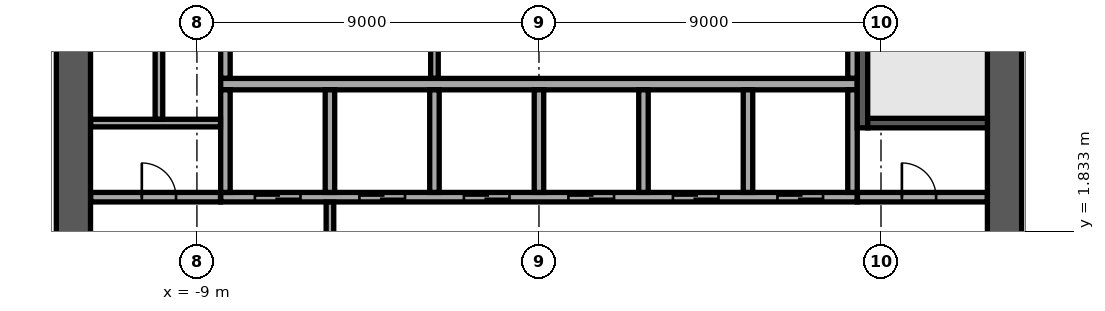
"""IFC4 building model, lengths in metres.
Left out: names, types, materials, properties, quantities, classifications, styles, units other than length and angle.
Written with IfcOpenShell. Run it as: python <this file> out.ifc"""

import sys

from ifc_helpers import new_model, si_unit, direction, frame, frame_2d, origin, place, context, subcontext, project, spatial, rectangle, extrude, element, fill, save


model = new_model("IFC4")
c1 = context("Model", 3, precision=1e-05, world=origin(), true_north=direction((0.0, 1.0)))
c2 = subcontext(c1, "Body", "Model", "MODEL_VIEW")
j1 = project(units=[si_unit("LENGTHUNIT", "METRE"), si_unit("PLANEANGLEUNIT", "RADIAN")], contexts=[c1])
p1 = place(None, origin())
s1 = spatial("IfcSite", under=j1, at=p1, CompositionType="ELEMENT")
p2 = place(p1, origin())
s2 = spatial("IfcBuilding", under=s1, at=p2, CompositionType="ELEMENT")
p3 = place(p2, frame((0.0, 0.0, 189.3)))
s3 = spatial("IfcBuildingStorey", under=s2, at=p3, CompositionType="ELEMENT", Elevation=189.3)
p4 = place(p3, frame((12.25, -11.8, 0.0), z_axis=(0.0, 0.0, 1.0), x_axis=(0.0, 1.0, 0.0)))
e1 = element("IfcWall", 1, at=p4, inside=s3, PredefinedType="SHEAR", context=c2, shape_type="SweptSolid", body=[
    extrude(rectangle(XDim=23.6, YDim=0.9, at=frame_2d((11.8, 0.0))), origin(), (0.0, 0.0, 1.0), 3.62),
])
p5 = place(p4, frame((10.6, 0.0, 0.0)))
e2 = element("IfcOpeningElement", 2, at=p5, cuts=e1, PredefinedType="OPENING", context=c2, shape_type="SweptSolid", body=[
    extrude(rectangle(XDim=2.4, YDim=2.4, at=frame_2d((1.2, 1.2))), frame((0.0, 0.46, 0.0), z_axis=(0.0, -1.0, 0.0), x_axis=(1.0, 0.0, 0.0)), (0.0, 0.0, 1.0), 0.92),
])
p6 = place(p3, frame((-12.25, -11.8, 0.0), z_axis=(0.0, 0.0, 1.0), x_axis=(0.0, 1.0, 0.0)))
e3 = element("IfcWall", 3, at=p6, inside=s3, PredefinedType="SHEAR", context=c2, shape_type="SweptSolid", body=[
    extrude(rectangle(XDim=23.6, YDim=0.9, at=frame_2d((11.8, 0.0))), origin(), (0.0, 0.0, 1.0), 3.62),
])
p7 = place(p6, frame((10.6, 0.0, 0.0)))
e4 = element("IfcOpeningElement", 4, at=p7, cuts=e3, PredefinedType="OPENING", context=c2, shape_type="SweptSolid", body=[
    extrude(rectangle(XDim=2.4, YDim=2.4, at=frame_2d((1.2, 1.2))), frame((0.0, 0.46, 0.0), z_axis=(0.0, -1.0, 0.0), x_axis=(1.0, 0.0, 0.0)), (0.0, 0.0, 1.0), 0.92),
])
p8 = place(p3, frame((-8.375, 5.7, 0.0), z_axis=(0.0, 0.0, 1.0), x_axis=(1.0, 0.0, 0.0)))
e5 = element("IfcWall", 5, at=p8, inside=s3, PredefinedType="SOLIDWALL", context=c2, shape_type="SweptSolid", body=[
    extrude(rectangle(XDim=16.75, YDim=0.3, at=frame_2d((8.375, 0.0))), origin(), (0.0, 0.0, 1.0), 3.62),
])
p9 = place(p3, frame((-8.375, 2.725, 0.0), z_axis=(0.0, 0.0, 1.0), x_axis=(1.0, 0.0, 0.0)))
e6 = element("IfcWall", 6, at=p9, inside=s3, PredefinedType="SOLIDWALL", context=c2, shape_type="SweptSolid", body=[
    extrude(rectangle(XDim=16.75, YDim=0.25, at=frame_2d((8.375, 0.0))), origin(), (0.0, 0.0, 1.0), 3.62),
])
p10 = place(p9, frame((0.9, 0.0, 0.0)))
e7 = element("IfcOpeningElement", 7, at=p10, cuts=e6, PredefinedType="OPENING", context=c2, shape_type="SweptSolid", body=[
    extrude(rectangle(XDim=1.2, YDim=2.1, at=frame_2d((0.6, 1.05))), frame((0.0, 0.135, 0.0), z_axis=(0.0, -1.0, 0.0), x_axis=(1.0, 0.0, 0.0)), (0.0, 0.0, 1.0), 0.27),
])
p11 = place(p9, frame((3.65, 0.0, 0.0)))
e8 = element("IfcOpeningElement", 8, at=p11, cuts=e6, PredefinedType="OPENING", context=c2, shape_type="SweptSolid", body=[
    extrude(rectangle(XDim=1.2, YDim=2.1, at=frame_2d((0.6, 1.05))), frame((0.0, 0.135, 0.0), z_axis=(0.0, -1.0, 0.0), x_axis=(1.0, 0.0, 0.0)), (0.0, 0.0, 1.0), 0.27),
])
p12 = place(p9, frame((6.4, 0.0, 0.0)))
e9 = element("IfcOpeningElement", 9, at=p12, cuts=e6, PredefinedType="OPENING", context=c2, shape_type="SweptSolid", body=[
    extrude(rectangle(XDim=1.2, YDim=2.1, at=frame_2d((0.6, 1.05))), frame((0.0, 0.135, 0.0), z_axis=(0.0, -1.0, 0.0), x_axis=(1.0, 0.0, 0.0)), (0.0, 0.0, 1.0), 0.27),
])
p13 = place(p9, frame((9.15, 0.0, 0.0)))
e10 = element("IfcOpeningElement", 10, at=p13, cuts=e6, PredefinedType="OPENING", context=c2, shape_type="SweptSolid", body=[
    extrude(rectangle(XDim=1.2, YDim=2.1, at=frame_2d((0.6, 1.05))), frame((0.0, 0.135, 0.0), z_axis=(0.0, -1.0, 0.0), x_axis=(1.0, 0.0, 0.0)), (0.0, 0.0, 1.0), 0.27),
])
p14 = place(p9, frame((11.9, 0.0, 0.0)))
e11 = element("IfcOpeningElement", 11, at=p14, cuts=e6, PredefinedType="OPENING", context=c2, shape_type="SweptSolid", body=[
    extrude(rectangle(XDim=1.2, YDim=2.1, at=frame_2d((0.6, 1.05))), frame((0.0, 0.135, 0.0), z_axis=(0.0, -1.0, 0.0), x_axis=(1.0, 0.0, 0.0)), (0.0, 0.0, 1.0), 0.27),
])
p15 = place(p9, frame((14.65, 0.0, 0.0)))
e12 = element("IfcOpeningElement", 12, at=p15, cuts=e6, PredefinedType="OPENING", context=c2, shape_type="SweptSolid", body=[
    extrude(rectangle(XDim=1.2, YDim=2.1, at=frame_2d((0.6, 1.05))), frame((0.0, 0.135, 0.0), z_axis=(0.0, -1.0, 0.0), x_axis=(1.0, 0.0, 0.0)), (0.0, 0.0, 1.0), 0.27),
])
for number, where, z_axis, x_axis in (
    (13, (-8.25, 2.85, 0.0), (0.0, 0.0, 1.0), (0.0, 1.0, 0.0)),
    (14, (-5.5, 2.85, 0.0), (0.0, 0.0, 1.0), (0.0, 1.0, 0.0)),
    (15, (-2.75, 2.85, 0.0), (0.0, 0.0, 1.0), (0.0, 1.0, 0.0)),
    (16, (0.0, 2.85, 0.0), (0.0, 0.0, 1.0), (0.0, 1.0, 0.0)),
    (17, (2.75, 2.85, 0.0), (0.0, 0.0, 1.0), (0.0, 1.0, 0.0)),
    (18, (5.5, 2.85, 0.0), (0.0, 0.0, 1.0), (0.0, 1.0, 0.0)),
    (19, (8.25, 2.85, 0.0), (0.0, 0.0, 1.0), (0.0, 1.0, 0.0)),
):
    element("IfcWall", number, at=place(p3, frame(where, z_axis=z_axis, x_axis=x_axis)), inside=s3, PredefinedType="SOLIDWALL", context=c2, shape_type="SweptSolid", body=[
        extrude(rectangle(XDim=2.7, YDim=0.25, at=frame_2d((1.35, 0.0))), origin(), (0.0, 0.0, 1.0), 3.62),
    ])
p16 = place(p3, frame((8.512, 4.55, 0.0), z_axis=(0.0, 0.0, 1.0), x_axis=(0.0, 1.0, 0.0)))
e20 = element("IfcWall", 20, at=p16, inside=s3, PredefinedType="SOLIDWALL", context=c2, shape_type="SweptSolid", body=[
    extrude(rectangle(XDim=7.25, YDim=0.275, at=frame_2d((3.625, 0.0))), origin(), (0.0, 0.0, 1.0), 3.62),
])
p17 = place(p16, frame((6.0, 0.0, 0.0)))
e21 = element("IfcOpeningElement", 21, at=p17, cuts=e20, PredefinedType="OPENING", context=c2, shape_type="SweptSolid", body=[
    extrude(rectangle(XDim=1.0, YDim=2.1, at=frame_2d((0.5, 1.05))), frame((0.0, 0.147, 0.0), z_axis=(0.0, -1.0, 0.0), x_axis=(1.0, 0.0, 0.0)), (0.0, 0.0, 1.0), 0.295),
])
p18 = place(p3, frame((8.65, 4.675, 0.0), z_axis=(0.0, 0.0, 1.0), x_axis=(1.0, 0.0, 0.0)))
e22 = element("IfcWall", 22, at=p18, inside=s3, PredefinedType="SOLIDWALL", context=c2, shape_type="SweptSolid", body=[
    extrude(rectangle(XDim=3.15, YDim=0.25, at=frame_2d((1.575, 0.0))), origin(), (0.0, 0.0, 1.0), 3.62),
])
p19 = place(p3, frame((-5.5, -2.595, 0.0), z_axis=(0.0, 0.0, 1.0), x_axis=(0.0, 1.0, 0.0)))
e23 = element("IfcWall", 23, at=p19, inside=s3, PredefinedType="PARTITIONING", context=c2, shape_type="SweptSolid", body=[
    extrude(rectangle(XDim=5.19, YDim=0.2, at=frame_2d((2.595, 0.0))), origin(), (0.0, 0.0, 1.0), 3.62),
])
p20 = place(p19, frame((1.395, 0.0, 0.0)))
e24 = element("IfcOpeningElement", 24, at=p20, cuts=e23, PredefinedType="OPENING", context=c2, shape_type="SweptSolid", body=[
    extrude(rectangle(XDim=2.4, YDim=2.4, at=frame_2d((1.2, 1.2))), frame((0.0, 0.11, 0.0), z_axis=(0.0, -1.0, 0.0), x_axis=(1.0, 0.0, 0.0)), (0.0, 0.0, 1.0), 0.22),
])
p21 = place(p3, frame((-11.795, 2.725, 0.0), z_axis=(0.0, 0.0, 1.0), x_axis=(1.0, 0.0, 0.0)))
e25 = element("IfcWall", 25, at=p21, inside=s3, PredefinedType="PARTITIONING", context=c2, shape_type="SweptSolid", body=[
    extrude(rectangle(XDim=3.415, YDim=0.25, at=frame_2d((1.708, 0.0))), origin(), (0.0, 0.0, 1.0), 3.62),
])
p22 = place(p21, frame((1.345, 0.0, 0.0)))
e26 = element("IfcOpeningElement", 26, at=p22, cuts=e25, PredefinedType="OPENING", context=c2, shape_type="SweptSolid", body=[
    extrude(rectangle(XDim=0.9, YDim=2.1, at=frame_2d((0.45, 1.05))), frame((0.0, 0.135, 0.0), z_axis=(0.0, -1.0, 0.0), x_axis=(1.0, 0.0, 0.0)), (0.0, 0.0, 1.0), 0.27),
])
p23 = place(p3, frame((8.38, 2.725, 0.0), z_axis=(0.0, 0.0, 1.0), x_axis=(1.0, 0.0, 0.0)))
e27 = element("IfcWall", 27, at=p23, inside=s3, PredefinedType="PARTITIONING", context=c2, shape_type="SweptSolid", body=[
    extrude(rectangle(XDim=3.415, YDim=0.25, at=frame_2d((1.708, 0.0))), origin(), (0.0, 0.0, 1.0), 3.62),
])
p24 = place(p23, frame((1.17, 0.0, 0.0)))
e28 = element("IfcOpeningElement", 28, at=p24, cuts=e27, PredefinedType="OPENING", context=c2, shape_type="SweptSolid", body=[
    extrude(rectangle(XDim=0.9, YDim=2.1, at=frame_2d((0.45, 1.05))), frame((0.0, 0.135, 0.0), z_axis=(0.0, -1.0, 0.0), x_axis=(1.0, 0.0, 0.0)), (0.0, 0.0, 1.0), 0.27),
])
p25 = place(p3, frame((-11.795, 4.675, 0.0), z_axis=(0.0, 0.0, 1.0), x_axis=(1.0, 0.0, 0.0)))
e29 = element("IfcWall", 29, at=p25, inside=s3, PredefinedType="PARTITIONING", context=c2, shape_type="SweptSolid", body=[
    extrude(rectangle(XDim=3.415, YDim=0.2, at=frame_2d((1.708, 0.0))), origin(), (0.0, 0.0, 1.0), 3.62),
])
p26 = place(p3, frame((-10.0, 4.78, 0.0), z_axis=(0.0, 0.0, 1.0), x_axis=(0.0, 1.0, 0.0)))
e30 = element("IfcWall", 30, at=p26, inside=s3, PredefinedType="PARTITIONING", context=c2, shape_type="SweptSolid", body=[
    extrude(rectangle(XDim=7.015, YDim=0.2, at=frame_2d((3.507, 0.0))), origin(), (0.0, 0.0, 1.0), 3.62),
])
p27 = place(p26, frame((2.92, 0.0, 0.0)))
e31 = element("IfcOpeningElement", 31, at=p27, cuts=e30, PredefinedType="OPENING", context=c2, shape_type="SweptSolid", body=[
    extrude(rectangle(XDim=1.0, YDim=2.1, at=frame_2d((0.5, 1.05))), frame((0.0, 0.11, 0.0), z_axis=(0.0, -1.0, 0.0), x_axis=(1.0, 0.0, 0.0)), (0.0, 0.0, 1.0), 0.22),
])
p28 = place(p3, frame((-8.25, 5.855, 0.0), z_axis=(0.0, 0.0, 1.0), x_axis=(0.0, 1.0, 0.0)))
e32 = element("IfcWall", 32, at=p28, inside=s3, PredefinedType="PARTITIONING", context=c2, shape_type="SweptSolid", body=[
    extrude(rectangle(XDim=2.69, YDim=0.25, at=frame_2d((1.345, 0.0))), origin(), (0.0, 0.0, 1.0), 3.62),
])
p29 = place(p3, frame((-2.75, 5.855, 0.0), z_axis=(0.0, 0.0, 1.0), x_axis=(0.0, 1.0, 0.0)))
e33 = element("IfcWall", 33, at=p29, inside=s3, PredefinedType="PARTITIONING", context=c2, shape_type="SweptSolid", body=[
    extrude(rectangle(XDim=2.69, YDim=0.2, at=frame_2d((1.345, 0.0))), origin(), (0.0, 0.0, 1.0), 3.62),
])
p30 = place(p3, frame((8.25, 5.855, 0.0), z_axis=(0.0, 0.0, 1.0), x_axis=(0.0, 1.0, 0.0)))
e34 = element("IfcWall", 34, at=p30, inside=s3, PredefinedType="PARTITIONING", context=c2, shape_type="SweptSolid", body=[
    extrude(rectangle(XDim=2.69, YDim=0.25, at=frame_2d((1.345, 0.0))), origin(), (0.0, 0.0, 1.0), 3.62),
])
p31 = place(p3, frame((2.286, 34.715, 0.0), z_axis=(0.0, 0.0, 1.0), x_axis=(-0.754708272811, -0.656060532993, 0.0)))
e35 = element("IfcWall", 35, at=p31, inside=s3, PredefinedType="STANDARD", context=c2, shape_type="SweptSolid", body=[
    extrude(rectangle(XDim=49.0, YDim=0.6, at=frame_2d((24.5, 0.0))), origin(), (0.0, 0.0, 1.0), 3.62),
])
p32 = place(p31, frame((1.227, 0.0, 0.9)))
e36 = element("IfcOpeningElement", 36, at=p32, cuts=e35, PredefinedType="OPENING", context=c2, shape_type="SweptSolid", body=[
    extrude(rectangle(XDim=2.0, YDim=2.1, at=frame_2d((1.0, 1.05))), frame((0.0, 0.31, 0.0), z_axis=(0.0, -1.0, 0.0), x_axis=(1.0, 0.0, 0.0)), (0.0, 0.0, 1.0), 0.62),
])
p33 = place(p31, frame((5.682, 0.0, 0.9)))
e37 = element("IfcOpeningElement", 37, at=p33, cuts=e35, PredefinedType="OPENING", context=c2, shape_type="SweptSolid", body=[
    extrude(rectangle(XDim=2.0, YDim=2.1, at=frame_2d((1.0, 1.05))), frame((0.0, 0.31, 0.0), z_axis=(0.0, -1.0, 0.0), x_axis=(1.0, 0.0, 0.0)), (0.0, 0.0, 1.0), 0.62),
])
p34 = place(p31, frame((10.136, 0.0, 0.9)))
e38 = element("IfcOpeningElement", 38, at=p34, cuts=e35, PredefinedType="OPENING", context=c2, shape_type="SweptSolid", body=[
    extrude(rectangle(XDim=2.0, YDim=2.1, at=frame_2d((1.0, 1.05))), frame((0.0, 0.31, 0.0), z_axis=(0.0, -1.0, 0.0), x_axis=(1.0, 0.0, 0.0)), (0.0, 0.0, 1.0), 0.62),
])
p35 = place(p31, frame((14.591, 0.0, 0.9)))
e39 = element("IfcOpeningElement", 39, at=p35, cuts=e35, PredefinedType="OPENING", context=c2, shape_type="SweptSolid", body=[
    extrude(rectangle(XDim=2.0, YDim=2.1, at=frame_2d((1.0, 1.05))), frame((0.0, 0.31, 0.0), z_axis=(0.0, -1.0, 0.0), x_axis=(1.0, 0.0, 0.0)), (0.0, 0.0, 1.0), 0.62),
])
p36 = place(p31, frame((19.045, 0.0, 0.9)))
e40 = element("IfcOpeningElement", 40, at=p36, cuts=e35, PredefinedType="OPENING", context=c2, shape_type="SweptSolid", body=[
    extrude(rectangle(XDim=2.0, YDim=2.1, at=frame_2d((1.0, 1.05))), frame((0.0, 0.31, 0.0), z_axis=(0.0, -1.0, 0.0), x_axis=(1.0, 0.0, 0.0)), (0.0, 0.0, 1.0), 0.62),
])
p37 = place(p31, frame((23.5, 0.0, 0.9)))
e41 = element("IfcOpeningElement", 41, at=p37, cuts=e35, PredefinedType="OPENING", context=c2, shape_type="SweptSolid", body=[
    extrude(rectangle(XDim=2.0, YDim=2.1, at=frame_2d((1.0, 1.05))), frame((0.0, 0.31, 0.0), z_axis=(0.0, -1.0, 0.0), x_axis=(1.0, 0.0, 0.0)), (0.0, 0.0, 1.0), 0.62),
])
p38 = place(p31, frame((27.955, 0.0, 0.9)))
e42 = element("IfcOpeningElement", 42, at=p38, cuts=e35, PredefinedType="OPENING", context=c2, shape_type="SweptSolid", body=[
    extrude(rectangle(XDim=2.0, YDim=2.1, at=frame_2d((1.0, 1.05))), frame((0.0, 0.31, 0.0), z_axis=(0.0, -1.0, 0.0), x_axis=(1.0, 0.0, 0.0)), (0.0, 0.0, 1.0), 0.62),
])
p39 = place(p31, frame((32.409, 0.0, 0.9)))
e43 = element("IfcOpeningElement", 43, at=p39, cuts=e35, PredefinedType="OPENING", context=c2, shape_type="SweptSolid", body=[
    extrude(rectangle(XDim=2.0, YDim=2.1, at=frame_2d((1.0, 1.05))), frame((0.0, 0.31, 0.0), z_axis=(0.0, -1.0, 0.0), x_axis=(1.0, 0.0, 0.0)), (0.0, 0.0, 1.0), 0.62),
])
p40 = place(p31, frame((36.864, 0.0, 0.9)))
e44 = element("IfcOpeningElement", 44, at=p40, cuts=e35, PredefinedType="OPENING", context=c2, shape_type="SweptSolid", body=[
    extrude(rectangle(XDim=2.0, YDim=2.1, at=frame_2d((1.0, 1.05))), frame((0.0, 0.31, 0.0), z_axis=(0.0, -1.0, 0.0), x_axis=(1.0, 0.0, 0.0)), (0.0, 0.0, 1.0), 0.62),
])
p41 = place(p31, frame((41.318, 0.0, 0.9)))
e45 = element("IfcOpeningElement", 45, at=p41, cuts=e35, PredefinedType="OPENING", context=c2, shape_type="SweptSolid", body=[
    extrude(rectangle(XDim=2.0, YDim=2.1, at=frame_2d((1.0, 1.05))), frame((0.0, 0.31, 0.0), z_axis=(0.0, -1.0, 0.0), x_axis=(1.0, 0.0, 0.0)), (0.0, 0.0, 1.0), 0.62),
])
p42 = place(p31, frame((45.773, 0.0, 0.9)))
e46 = element("IfcOpeningElement", 46, at=p42, cuts=e35, PredefinedType="OPENING", context=c2, shape_type="SweptSolid", body=[
    extrude(rectangle(XDim=2.0, YDim=2.1, at=frame_2d((1.0, 1.05))), frame((0.0, 0.31, 0.0), z_axis=(0.0, -1.0, 0.0), x_axis=(1.0, 0.0, 0.0)), (0.0, 0.0, 1.0), 0.62),
])
p43 = place(p3, frame((35.208, 4.768, 0.0), z_axis=(0.0, 0.0, 1.0), x_axis=(-0.656058749455, 0.754709823219, 0.0)))
e47 = element("IfcWall", 47, at=p43, inside=s3, PredefinedType="STANDARD", context=c2, shape_type="SweptSolid", body=[
    extrude(rectangle(XDim=39.0, YDim=0.6, at=frame_2d((19.5, 0.0))), origin(), (0.0, 0.0, 1.0), 3.62),
])
p44 = place(p43, frame((1.217, 0.0, 0.9)))
e48 = element("IfcOpeningElement", 48, at=p44, cuts=e47, PredefinedType="OPENING", context=c2, shape_type="SweptSolid", body=[
    extrude(rectangle(XDim=1.9, YDim=2.1, at=frame_2d((0.95, 1.05))), frame((0.0, 0.31, 0.0), z_axis=(0.0, -1.0, 0.0), x_axis=(1.0, 0.0, 0.0)), (0.0, 0.0, 1.0), 0.62),
])
p45 = place(p43, frame((5.55, 0.0, 0.9)))
e49 = element("IfcOpeningElement", 49, at=p45, cuts=e47, PredefinedType="OPENING", context=c2, shape_type="SweptSolid", body=[
    extrude(rectangle(XDim=1.9, YDim=2.1, at=frame_2d((0.95, 1.05))), frame((0.0, 0.31, 0.0), z_axis=(0.0, -1.0, 0.0), x_axis=(1.0, 0.0, 0.0)), (0.0, 0.0, 1.0), 0.62),
])
p46 = place(p43, frame((9.883, 0.0, 0.9)))
e50 = element("IfcOpeningElement", 50, at=p46, cuts=e47, PredefinedType="OPENING", context=c2, shape_type="SweptSolid", body=[
    extrude(rectangle(XDim=1.9, YDim=2.1, at=frame_2d((0.95, 1.05))), frame((0.0, 0.31, 0.0), z_axis=(0.0, -1.0, 0.0), x_axis=(1.0, 0.0, 0.0)), (0.0, 0.0, 1.0), 0.62),
])
p47 = place(p43, frame((14.217, 0.0, 0.9)))
e51 = element("IfcOpeningElement", 51, at=p47, cuts=e47, PredefinedType="OPENING", context=c2, shape_type="SweptSolid", body=[
    extrude(rectangle(XDim=1.9, YDim=2.1, at=frame_2d((0.95, 1.05))), frame((0.0, 0.31, 0.0), z_axis=(0.0, -1.0, 0.0), x_axis=(1.0, 0.0, 0.0)), (0.0, 0.0, 1.0), 0.62),
])
p48 = place(p43, frame((18.55, 0.0, 0.9)))
e52 = element("IfcOpeningElement", 52, at=p48, cuts=e47, PredefinedType="OPENING", context=c2, shape_type="SweptSolid", body=[
    extrude(rectangle(XDim=1.9, YDim=2.1, at=frame_2d((0.95, 1.05))), frame((0.0, 0.31, 0.0), z_axis=(0.0, -1.0, 0.0), x_axis=(1.0, 0.0, 0.0)), (0.0, 0.0, 1.0), 0.62),
])
p49 = place(p43, frame((22.883, 0.0, 0.9)))
e53 = element("IfcOpeningElement", 53, at=p49, cuts=e47, PredefinedType="OPENING", context=c2, shape_type="SweptSolid", body=[
    extrude(rectangle(XDim=1.9, YDim=2.1, at=frame_2d((0.95, 1.05))), frame((0.0, 0.31, 0.0), z_axis=(0.0, -1.0, 0.0), x_axis=(1.0, 0.0, 0.0)), (0.0, 0.0, 1.0), 0.62),
])
p50 = place(p43, frame((27.217, 0.0, 0.9)))
e54 = element("IfcOpeningElement", 54, at=p50, cuts=e47, PredefinedType="OPENING", context=c2, shape_type="SweptSolid", body=[
    extrude(rectangle(XDim=1.9, YDim=2.1, at=frame_2d((0.95, 1.05))), frame((0.0, 0.31, 0.0), z_axis=(0.0, -1.0, 0.0), x_axis=(1.0, 0.0, 0.0)), (0.0, 0.0, 1.0), 0.62),
])
p51 = place(p43, frame((31.55, 0.0, 0.9)))
e55 = element("IfcOpeningElement", 55, at=p51, cuts=e47, PredefinedType="OPENING", context=c2, shape_type="SweptSolid", body=[
    extrude(rectangle(XDim=1.9, YDim=2.1, at=frame_2d((0.95, 1.05))), frame((0.0, 0.31, 0.0), z_axis=(0.0, -1.0, 0.0), x_axis=(1.0, 0.0, 0.0)), (0.0, 0.0, 1.0), 0.62),
])
p52 = place(p43, frame((35.883, 0.0, 0.9)))
e56 = element("IfcOpeningElement", 56, at=p52, cuts=e47, PredefinedType="OPENING", context=c2, shape_type="SweptSolid", body=[
    extrude(rectangle(XDim=1.9, YDim=2.1, at=frame_2d((0.95, 1.05))), frame((0.0, 0.31, 0.0), z_axis=(0.0, -1.0, 0.0), x_axis=(1.0, 0.0, 0.0)), (0.0, 0.0, 1.0), 0.62),
])
p53 = place(p3, frame((-26.208, 2.616, 0.0), z_axis=(0.0, 0.0, 1.0), x_axis=(0.754710701231, 0.656057739416, 0.0)))
e57 = element("IfcWall", 57, at=p53, inside=s3, PredefinedType="PARTITIONING", context=c2, shape_type="SweptSolid", body=[
    extrude(rectangle(XDim=36.126, YDim=0.15, at=frame_2d((18.063, 0.0))), origin(), (0.0, 0.0, 1.0), 3.17),
])
p54 = place(p53, frame((2.551, 0.0, 0.0)))
e58 = element("IfcOpeningElement", 58, at=p54, cuts=e57, PredefinedType="OPENING", context=c2, shape_type="SweptSolid", body=[
    extrude(rectangle(XDim=1.0, YDim=2.1, at=frame_2d((0.5, 1.05))), frame((0.0, 0.085, 0.0), z_axis=(0.0, -1.0, 0.0), x_axis=(1.0, 0.0, 0.0)), (0.0, 0.0, 1.0), 0.17),
])
p55 = place(p53, frame((15.362, 0.0, 0.0)))
e59 = element("IfcOpeningElement", 59, at=p55, cuts=e57, PredefinedType="OPENING", context=c2, shape_type="SweptSolid", body=[
    extrude(rectangle(XDim=1.0, YDim=2.1, at=frame_2d((0.5, 1.05))), frame((0.0, 0.085, 0.0), z_axis=(0.0, -1.0, 0.0), x_axis=(1.0, 0.0, 0.0)), (0.0, 0.0, 1.0), 0.17),
])
p56 = place(p53, frame((25.542, 0.0, 0.0)))
e60 = element("IfcOpeningElement", 60, at=p56, cuts=e57, PredefinedType="OPENING", context=c2, shape_type="SweptSolid", body=[
    extrude(rectangle(XDim=1.8, YDim=2.1, at=frame_2d((0.9, 1.05))), frame((0.0, 0.085, 0.0), z_axis=(0.0, -1.0, 0.0), x_axis=(1.0, 0.0, 0.0)), (0.0, 0.0, 1.0), 0.17),
])
p57 = place(p3, frame((8.103, 24.087, 0.0), z_axis=(0.0, 0.0, 1.0), x_axis=(0.656048444225, -0.754718781289, 0.0)))
e61 = element("IfcWall", 61, at=p57, inside=s3, PredefinedType="PARTITIONING", context=c2, shape_type="SweptSolid", body=[
    extrude(rectangle(XDim=25.8, YDim=0.15, at=frame_2d((12.9, 0.0))), origin(), (0.0, 0.0, 1.0), 3.17),
])
p58 = place(p10, origin())
e62 = element("IfcDoor", 62, at=p58, inside=s3, OperationType="DOUBLE_DOOR_SLIDING", PredefinedType="DOOR", context=c2, shape_type="SweptSolid", body=[
    extrude(rectangle(XDim=1.2, YDim=2.1, at=frame_2d((0.6, 1.05))), frame((0.0, 0.025, 0.0), z_axis=(0.0, -1.0, 0.0), x_axis=(1.0, 0.0, 0.0)), (0.0, 0.0, 1.0), 0.05),
])
fill(e7, e62)
p59 = place(p11, origin())
e63 = element("IfcDoor", 63, at=p59, inside=s3, OperationType="DOUBLE_DOOR_SLIDING", PredefinedType="DOOR", context=c2, shape_type="SweptSolid", body=[
    extrude(rectangle(XDim=1.2, YDim=2.1, at=frame_2d((0.6, 1.05))), frame((0.0, 0.025, 0.0), z_axis=(0.0, -1.0, 0.0), x_axis=(1.0, 0.0, 0.0)), (0.0, 0.0, 1.0), 0.05),
])
fill(e8, e63)
p60 = place(p12, origin())
e64 = element("IfcDoor", 64, at=p60, inside=s3, OperationType="DOUBLE_DOOR_SLIDING", PredefinedType="DOOR", context=c2, shape_type="SweptSolid", body=[
    extrude(rectangle(XDim=1.2, YDim=2.1, at=frame_2d((0.6, 1.05))), frame((0.0, 0.025, 0.0), z_axis=(0.0, -1.0, 0.0), x_axis=(1.0, 0.0, 0.0)), (0.0, 0.0, 1.0), 0.05),
])
fill(e9, e64)
p61 = place(p13, origin())
e65 = element("IfcDoor", 65, at=p61, inside=s3, OperationType="DOUBLE_DOOR_SLIDING", PredefinedType="DOOR", context=c2, shape_type="SweptSolid", body=[
    extrude(rectangle(XDim=1.2, YDim=2.1, at=frame_2d((0.6, 1.05))), frame((0.0, 0.025, 0.0), z_axis=(0.0, -1.0, 0.0), x_axis=(1.0, 0.0, 0.0)), (0.0, 0.0, 1.0), 0.05),
])
fill(e10, e65)
p62 = place(p14, origin())
e66 = element("IfcDoor", 66, at=p62, inside=s3, OperationType="DOUBLE_DOOR_SLIDING", PredefinedType="DOOR", context=c2, shape_type="SweptSolid", body=[
    extrude(rectangle(XDim=1.2, YDim=2.1, at=frame_2d((0.6, 1.05))), frame((0.0, 0.025, 0.0), z_axis=(0.0, -1.0, 0.0), x_axis=(1.0, 0.0, 0.0)), (0.0, 0.0, 1.0), 0.05),
])
fill(e11, e66)
p63 = place(p15, origin())
e67 = element("IfcDoor", 67, at=p63, inside=s3, OperationType="DOUBLE_DOOR_SLIDING", PredefinedType="DOOR", context=c2, shape_type="SweptSolid", body=[
    extrude(rectangle(XDim=1.2, YDim=2.1, at=frame_2d((0.6, 1.05))), frame((0.0, 0.025, 0.0), z_axis=(0.0, -1.0, 0.0), x_axis=(1.0, 0.0, 0.0)), (0.0, 0.0, 1.0), 0.05),
])
fill(e12, e67)
p64 = place(p24, origin())
e68 = element("IfcDoor", 68, at=p64, inside=s3, OperationType="SINGLE_SWING_LEFT", PredefinedType="DOOR", context=c2, shape_type="SweptSolid", body=[
    extrude(rectangle(XDim=0.9, YDim=2.1, at=frame_2d((0.45, 1.05))), frame((0.0, 0.025, 0.0), z_axis=(0.0, -1.0, 0.0), x_axis=(1.0, 0.0, 0.0)), (0.0, 0.0, 1.0), 0.05),
])
fill(e28, e68)
p65 = place(p22, origin())
e69 = element("IfcDoor", 69, at=p65, inside=s3, OperationType="SINGLE_SWING_LEFT", PredefinedType="DOOR", context=c2, shape_type="SweptSolid", body=[
    extrude(rectangle(XDim=0.9, YDim=2.1, at=frame_2d((0.45, 1.05))), frame((0.0, 0.025, 0.0), z_axis=(0.0, -1.0, 0.0), x_axis=(1.0, 0.0, 0.0)), (0.0, 0.0, 1.0), 0.05),
])
fill(e26, e69)
save(model, sys.argv[1])
